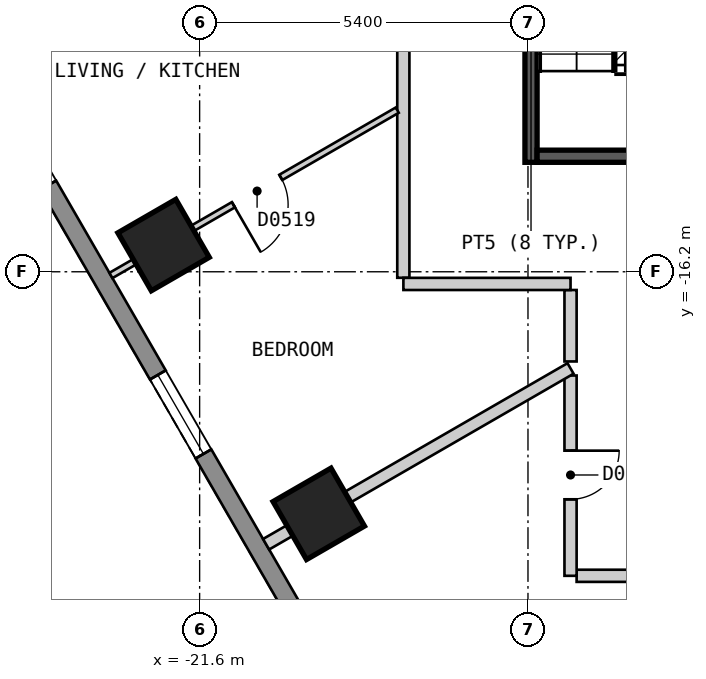
"""IFC4 building model, lengths in metres.
Left out: names, types, materials, properties, quantities, classifications, styles, units other than length and angle.
Written with IfcOpenShell. Run it as: python <this file> out.ifc"""

import sys

from ifc_helpers import new_model, si_unit, direction, frame, frame_2d, origin, origin_2d, place, context, subcontext, project, spatial, polyline, rectangle, outline, extrude, element, fill, save


model = new_model("IFC4")
c1 = context("Model", 3, precision=1e-05, world=origin(), true_north=direction((0.0, 1.0)))
c2 = subcontext(c1, "Body", "Model", "MODEL_VIEW")
j1 = project(units=[si_unit("LENGTHUNIT", "METRE"), si_unit("PLANEANGLEUNIT", "RADIAN")], contexts=[c1])
p1 = place(None, origin())
s1 = spatial("IfcSite", under=j1, at=p1, CompositionType="ELEMENT")
p2 = place(p1, origin())
s2 = spatial("IfcBuilding", under=s1, at=p2, CompositionType="ELEMENT")
p3 = place(p2, frame((0.0, 0.0, 50.4)))
s3 = spatial("IfcBuildingStorey", under=s2, at=p3, CompositionType="ELEMENT", Elevation=50.4)
for number, where, z_axis, x_axis in (
    (1, (-22.193, -15.761, 0.0), (0.0, 0.0, 1.0), (0.5, -0.866, 0.0)),
    (2, (-19.641, -20.181, 0.0), (0.0, 0.0, 1.0), (0.5, -0.866, 0.0)),
):
    element("IfcColumn", number, at=place(p3, frame(where, z_axis=z_axis, x_axis=x_axis)), inside=s3, PredefinedType="COLUMN", context=c2, shape_type="SweptSolid", body=[
        extrude(rectangle(XDim=1.1, YDim=1.1, at=origin_2d()), origin(), (0.0, 0.0, 1.0), 3.0),
    ])
p4 = place(p3, frame((-31.22, -2.425, 0.0), z_axis=(0.0, 0.0, 1.0), x_axis=(0.500001938803, -0.866024284413, 0.0)))
e3 = element("IfcWall", 3, at=p4, inside=s3, PredefinedType="SOLIDWALL", context=c2, shape_type="SweptSolid", body=[
    extrude(outline(polyline([(0.0, -0.15), (27.02, -0.15), (26.94, 0.15), (0.08, 0.15), (0.0, -0.15)])), origin(), (0.0, 0.0, 1.0), 2.7),
])
p5 = place(p4, frame((2.553, 0.0, 0.15)))
e4 = element("IfcOpeningElement", 4, at=p5, cuts=e3, PredefinedType="OPENING", context=c2, shape_type="SweptSolid", body=[
    extrude(rectangle(XDim=1.5, YDim=2.1, at=frame_2d((0.75, 1.05))), frame((0.0, 0.16, 0.0), z_axis=(0.0, -1.0, 0.0), x_axis=(1.0, 0.0, 0.0)), (0.0, 0.0, 1.0), 0.32),
])
p6 = place(p4, frame((7.657, 0.0, 0.15)))
e5 = element("IfcOpeningElement", 5, at=p6, cuts=e3, PredefinedType="OPENING", context=c2, shape_type="SweptSolid", body=[
    extrude(rectangle(XDim=1.5, YDim=2.1, at=frame_2d((0.75, 1.05))), frame((0.0, 0.16, 0.0), z_axis=(0.0, -1.0, 0.0), x_axis=(1.0, 0.0, 0.0)), (0.0, 0.0, 1.0), 0.32),
])
p7 = place(p4, frame((12.761, 0.0, 0.15)))
e6 = element("IfcOpeningElement", 6, at=p7, cuts=e3, PredefinedType="OPENING", context=c2, shape_type="SweptSolid", body=[
    extrude(rectangle(XDim=1.5, YDim=2.1, at=frame_2d((0.75, 1.05))), frame((0.0, 0.16, 0.0), z_axis=(0.0, -1.0, 0.0), x_axis=(1.0, 0.0, 0.0)), (0.0, 0.0, 1.0), 0.32),
])
p8 = place(p4, frame((17.865, 0.0, 0.15)))
e7 = element("IfcOpeningElement", 7, at=p8, cuts=e3, PredefinedType="OPENING", context=c2, shape_type="SweptSolid", body=[
    extrude(rectangle(XDim=1.5, YDim=2.1, at=frame_2d((0.75, 1.05))), frame((0.0, 0.16, 0.0), z_axis=(0.0, -1.0, 0.0), x_axis=(1.0, 0.0, 0.0)), (0.0, 0.0, 1.0), 0.32),
])
p9 = place(p4, frame((22.969, 0.0, 0.15)))
e8 = element("IfcOpeningElement", 8, at=p9, cuts=e3, PredefinedType="OPENING", context=c2, shape_type="SweptSolid", body=[
    extrude(rectangle(XDim=1.5, YDim=2.1, at=frame_2d((0.75, 1.05))), frame((0.0, 0.16, 0.0), z_axis=(0.0, -1.0, 0.0), x_axis=(1.0, 0.0, 0.0)), (0.0, 0.0, 1.0), 0.32),
])
p10 = place(p3, frame((-15.5, -16.5, 0.0), z_axis=(0.0, 0.0, 1.0), x_axis=(0.0, -1.0, 0.0)))
e9 = element("IfcWall", 9, at=p10, inside=s3, PredefinedType="PARTITIONING", context=c2, shape_type="SweptSolid", body=[
    extrude(rectangle(XDim=1.175, YDim=0.2, at=frame_2d((0.587, 0.0))), origin(), (0.0, 0.0, 1.0), 2.7),
])
p11 = place(p3, frame((-18.25, -11.507, 0.0), z_axis=(0.0, 0.0, 1.0), x_axis=(0.0, -1.0, 0.0)))
e10 = element("IfcWall", 10, at=p11, inside=s3, PredefinedType="PARTITIONING", context=c2, shape_type="SweptSolid", body=[
    extrude(rectangle(XDim=4.792, YDim=0.2, at=frame_2d((2.396, 0.0))), origin(), (0.0, 0.0, 1.0), 2.7),
])
p12 = place(p3, frame((-18.249, -16.4, 0.0), z_axis=(0.0, 0.0, 1.0), x_axis=(1.0, 0.0, 0.0)))
e11 = element("IfcWall", 11, at=p12, inside=s3, PredefinedType="PARTITIONING", context=c2, shape_type="SweptSolid", body=[
    extrude(rectangle(XDim=2.749, YDim=0.2, at=frame_2d((1.375, 0.0))), origin(), (0.0, 0.0, 1.0), 2.7),
])
p13 = place(p3, frame((-15.4, -21.2, 0.0), z_axis=(0.0, 0.0, 1.0), x_axis=(1.0, 0.0, 0.0)))
e12 = element("IfcWall", 12, at=p13, inside=s3, PredefinedType="PARTITIONING", context=c2, shape_type="SweptSolid", body=[
    extrude(rectangle(XDim=30.799, YDim=0.2, at=frame_2d((15.399, 0.0))), origin(), (0.0, 0.0, 1.0), 2.7),
])
p14 = place(p13, frame((4.985, 0.0, 0.0)))
e13 = element("IfcOpeningElement", 13, at=p14, cuts=e12, PredefinedType="OPENING", context=c2, shape_type="SweptSolid", body=[
    extrude(rectangle(XDim=0.9, YDim=2.1, at=frame_2d((0.45, 1.05))), frame((0.0, 0.11, 0.0), z_axis=(0.0, -1.0, 0.0), x_axis=(1.0, 0.0, 0.0)), (0.0, 0.0, 1.0), 0.22),
])
p15 = place(p13, frame((20.005, 0.0, 0.0)))
e14 = element("IfcOpeningElement", 14, at=p15, cuts=e12, PredefinedType="OPENING", context=c2, shape_type="SweptSolid", body=[
    extrude(rectangle(XDim=1.0, YDim=2.1, at=frame_2d((0.5, 1.05))), frame((0.0, 0.11, 0.0), z_axis=(0.0, -1.0, 0.0), x_axis=(1.0, 0.0, 0.0)), (0.0, 0.0, 1.0), 0.22),
])
p16 = place(p13, frame((24.916, 0.0, 0.0)))
e15 = element("IfcOpeningElement", 15, at=p16, cuts=e12, PredefinedType="OPENING", context=c2, shape_type="SweptSolid", body=[
    extrude(rectangle(XDim=0.9, YDim=2.1, at=frame_2d((0.45, 1.05))), frame((0.0, 0.11, 0.0), z_axis=(0.0, -1.0, 0.0), x_axis=(1.0, 0.0, 0.0)), (0.0, 0.0, 1.0), 0.22),
])
p17 = place(p3, frame((-15.5, -21.2, 0.0), z_axis=(0.0, 0.0, 1.0), x_axis=(0.0, 1.0, 0.0)))
e16 = element("IfcWall", 16, at=p17, inside=s3, PredefinedType="PARTITIONING", context=c2, shape_type="SweptSolid", body=[
    extrude(rectangle(XDim=3.294, YDim=0.2, at=frame_2d((1.647, 0.0))), origin(), (0.0, 0.0, 1.0), 2.7),
])
p18 = place(p17, frame((1.258, 0.0, 0.0)))
e17 = element("IfcOpeningElement", 17, at=p18, cuts=e16, PredefinedType="OPENING", context=c2, shape_type="SweptSolid", body=[
    extrude(rectangle(XDim=0.8, YDim=2.1, at=frame_2d((0.4, 1.05))), frame((0.0, 0.11, 0.0), z_axis=(0.0, -1.0, 0.0), x_axis=(1.0, 0.0, 0.0)), (0.0, 0.0, 1.0), 0.22),
])
p19 = place(p3, frame((-23.059, -16.261, 0.0), z_axis=(0.0, 0.0, 1.0), x_axis=(0.866004639177, 0.500035963631, 0.0)))
e18 = element("IfcWall", 18, at=p19, inside=s3, PredefinedType="PARTITIONING", context=c2, shape_type="SweptSolid", body=[
    extrude(rectangle(XDim=5.438, YDim=0.1, at=frame_2d((2.719, 0.0))), origin(), (0.0, 0.0, 1.0), 2.7),
])
p20 = place(p19, frame((2.326, 0.0, 0.0)))
e19 = element("IfcOpeningElement", 19, at=p20, cuts=e18, PredefinedType="OPENING", context=c2, shape_type="SweptSolid", body=[
    extrude(rectangle(XDim=0.9, YDim=2.1, at=frame_2d((0.45, 1.05))), frame((0.0, 0.06, 0.0), z_axis=(0.0, -1.0, 0.0), x_axis=(1.0, 0.0, 0.0)), (0.0, 0.0, 1.0), 0.12),
])
p21 = place(p3, frame((-20.507, -20.681, 0.0), z_axis=(0.0, 0.0, 1.0), x_axis=(0.86602314875, 0.500003905814, 0.0)))
e20 = element("IfcWall", 20, at=p21, inside=s3, PredefinedType="PARTITIONING", context=c2, shape_type="SweptSolid", body=[
    extrude(rectangle(XDim=5.782, YDim=0.2, at=frame_2d((2.891, 0.0))), origin(), (0.0, 0.0, 1.0), 2.7),
])
p22 = place(p3, frame((-16.15, -14.4, 0.0), z_axis=(0.0, 0.0, 1.0), x_axis=(0.0, 1.0, 0.0)))
e21 = element("IfcWall", 21, at=p22, inside=s3, PredefinedType="SOLIDWALL", context=c2, shape_type="SweptSolid", body=[
    extrude(rectangle(XDim=5.8, YDim=0.2, at=frame_2d((2.9, 0.0))), origin(), (0.0, 0.0, 1.0), 2.7),
])
p23 = place(p3, frame((-16.05, -14.3, 0.0), z_axis=(0.0, 0.0, 1.0), x_axis=(1.0, 0.0, 0.0)))
e22 = element("IfcWall", 22, at=p23, inside=s3, PredefinedType="SOLIDWALL", context=c2, shape_type="SweptSolid", body=[
    extrude(rectangle(XDim=2.75, YDim=0.2, at=frame_2d((1.375, 0.0))), origin(), (0.0, 0.0, 1.0), 2.7),
])
p24 = place(p8, origin())
e23 = element("IfcWindow", 23, at=p24, inside=s3, PartitioningType="SINGLE_PANEL", PredefinedType="WINDOW", context=c2, shape_type="SweptSolid", body=[
    extrude(rectangle(XDim=1.5, YDim=2.1, at=frame_2d((0.75, 1.05))), frame((0.0, 0.03, 0.0), z_axis=(0.0, -1.0, 0.0), x_axis=(1.0, 0.0, 0.0)), (0.0, 0.0, 1.0), 0.06),
])
fill(e7, e23)
p25 = place(p20, origin())
e24 = element("IfcDoor", 24, at=p25, inside=s3, OperationType="SINGLE_SWING_LEFT", PredefinedType="DOOR", context=c2, shape_type="SweptSolid", body=[
    extrude(rectangle(XDim=0.9, YDim=2.1, at=frame_2d((0.45, 1.05))), frame((0.0, 0.025, 0.0), z_axis=(0.0, -1.0, 0.0), x_axis=(1.0, 0.0, 0.0)), (0.0, 0.0, 1.0), 0.05),
])
fill(e19, e24)
p26 = place(p18, origin())
e25 = element("IfcDoor", 25, at=p26, inside=s3, OperationType="SINGLE_SWING_RIGHT", PredefinedType="DOOR", context=c2, shape_type="SweptSolid", body=[
    extrude(rectangle(XDim=0.8, YDim=2.1, at=frame_2d((0.4, 1.05))), frame((0.0, 0.025, 0.0), z_axis=(0.0, -1.0, 0.0), x_axis=(1.0, 0.0, 0.0)), (0.0, 0.0, 1.0), 0.05),
])
fill(e17, e25)
save(model, sys.argv[1])
